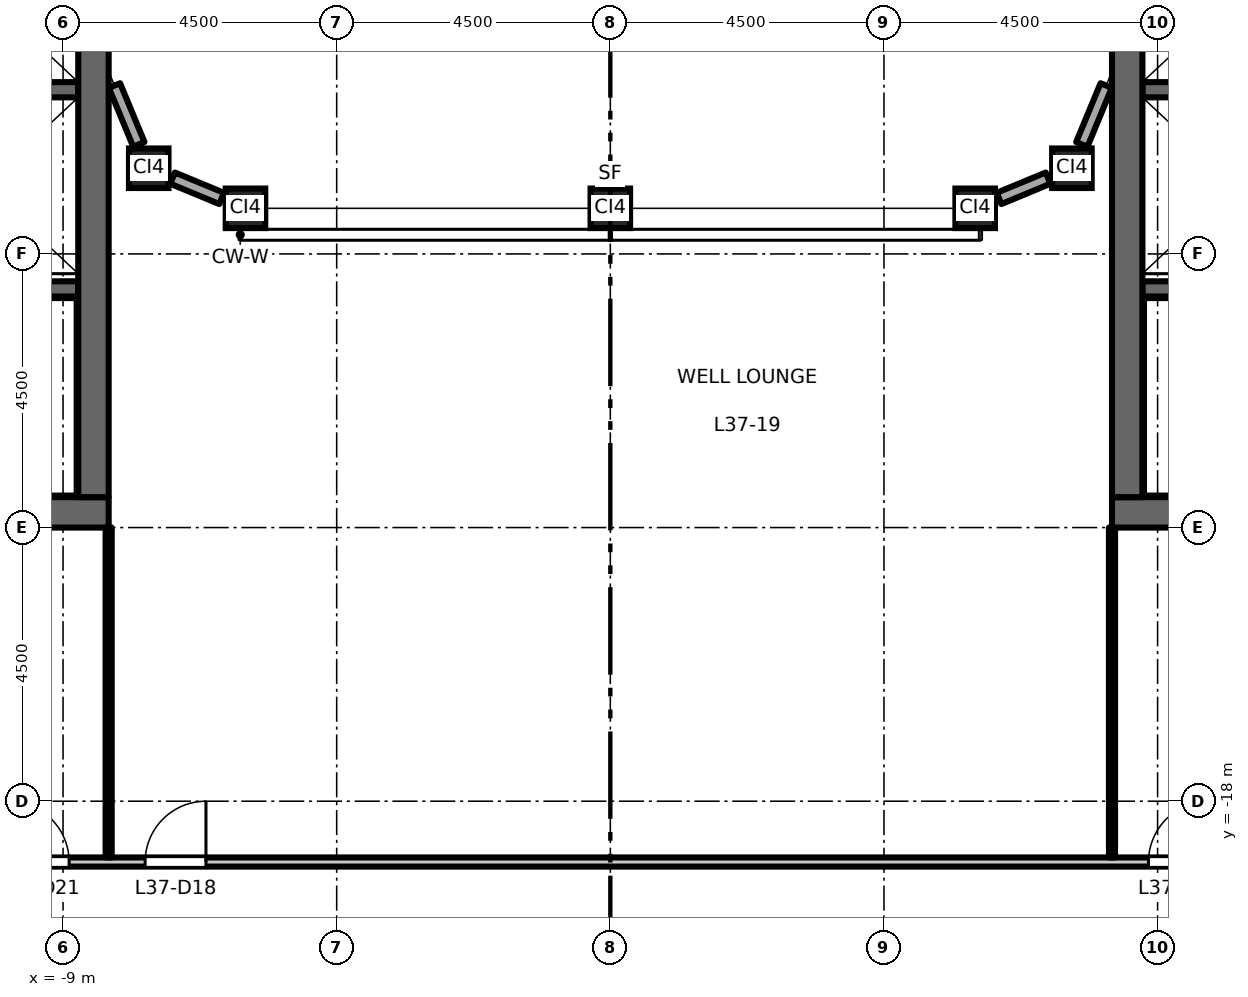
"""IFC4 building model, lengths in metres.
Left out: names, types, materials, properties, quantities, classifications, styles, units other than length and angle.
Written with IfcOpenShell. Run it as: python <this file> out.ifc"""

import sys

from ifc_helpers import new_model, si_unit, direction, frame, frame_2d, origin, origin_2d, place, context, subcontext, project, spatial, rectangle, hollow_rectangle, extrude, element, fill, save


model = new_model("IFC4")
c1 = context("Model", 3, precision=1e-05, world=origin(), true_north=direction((0.0, 1.0)))
c2 = subcontext(c1, "Body", "Model", "MODEL_VIEW")
j1 = project(units=[si_unit("LENGTHUNIT", "METRE"), si_unit("PLANEANGLEUNIT", "RADIAN")], contexts=[c1])
p1 = place(None, origin())
s1 = spatial("IfcSite", under=j1, at=p1, CompositionType="ELEMENT")
p2 = place(p1, origin())
s2 = spatial("IfcBuilding", under=s1, at=p2, CompositionType="ELEMENT")
p3 = place(p2, frame((0.0, 0.0, 172.2)))
s3 = spatial("IfcBuildingStorey", under=s2, at=p3, CompositionType="ELEMENT", Elevation=172.2)
for number, where, z_axis, x_axis in (
    (1, (-7.591, -7.591, 0.0), (0.0, 0.0, 1.0), (1.0, 0.0, 0.0)),
    (2, (-6.0, -8.25, 0.0), (0.0, 0.0, 1.0), (1.0, 0.0, 0.0)),
    (3, (0.0, -8.25, 0.0), (0.0, 0.0, 1.0), (1.0, 0.0, 0.0)),
    (4, (6.0, -8.25, 0.0), (0.0, 0.0, 1.0), (1.0, 0.0, 0.0)),
    (5, (7.591, -7.591, 0.0), (0.0, 0.0, 1.0), (1.0, 0.0, 0.0)),
):
    element("IfcColumn", number, at=place(p3, frame(where, z_axis=z_axis, x_axis=x_axis)), inside=s3, PredefinedType="COLUMN", context=c2, shape_type="SweptSolid", body=[
        extrude(hollow_rectangle(XDim=0.65, YDim=0.65, WallThickness=0.036, at=origin_2d()), origin(), (0.0, 0.0, 1.0), 4.5),
    ])
p4 = place(p3, frame((-8.75, -6.3, 0.0), z_axis=(0.0, 0.0, 1.0), x_axis=(-1.0, 0.0, 0.0)))
e6 = element("IfcWall", 6, at=p4, inside=s3, PredefinedType="SHEAR", context=c2, shape_type="SweptSolid", body=[
    extrude(rectangle(XDim=3.1, YDim=0.25, at=frame_2d((1.55, 0.0))), origin(), (0.0, 0.0, 1.0), 4.35),
])
p5 = place(p3, frame((-8.75, -9.575, 0.0), z_axis=(0.0, 0.0, 1.0), x_axis=(-1.0, 0.0, 0.0)))
e7 = element("IfcWall", 7, at=p5, inside=s3, PredefinedType="SHEAR", context=c2, shape_type="SweptSolid", body=[
    extrude(rectangle(XDim=8.0, YDim=0.25, at=frame_2d((4.0, 0.0))), origin(), (0.0, 0.0, 1.0), 4.35),
])
p6 = place(p5, frame((6.65, 0.0, 0.0)))
e8 = element("IfcOpeningElement", 8, at=p6, cuts=e7, PredefinedType="OPENING", context=c2, shape_type="SweptSolid", body=[
    extrude(rectangle(XDim=1.1, YDim=2.1, at=frame_2d((0.55, 1.05))), frame((0.0, 0.135, 0.0), z_axis=(0.0, -1.0, 0.0), x_axis=(1.0, 0.0, 0.0)), (0.0, 0.0, 1.0), 0.27),
])
p7 = place(p3, frame((-8.25, -13.25, 0.0), z_axis=(0.0, 0.0, 1.0), x_axis=(-1.0, 0.0, 0.0)))
e9 = element("IfcWall", 9, at=p7, inside=s3, PredefinedType="SHEAR", context=c2, shape_type="SweptSolid", body=[
    extrude(rectangle(XDim=13.5, YDim=0.5, at=frame_2d((6.75, 0.0))), origin(), (0.0, 0.0, 1.0), 4.35),
])
p8 = place(p3, frame((-8.5, -13.0, 0.0), z_axis=(0.0, 0.0, 1.0), x_axis=(0.0, 1.0, 0.0)))
e10 = element("IfcWall", 10, at=p8, inside=s3, PredefinedType="SHEAR", context=c2, shape_type="SweptSolid", body=[
    extrude(rectangle(XDim=26.0, YDim=0.5, at=frame_2d((13.0, 0.0))), origin(), (0.0, 0.0, 1.0), 4.35),
])
p9 = place(p3, frame((8.75, -6.3, 0.0), z_axis=(0.0, 0.0, 1.0), x_axis=(1.0, 0.0, 0.0)))
e11 = element("IfcWall", 11, at=p9, inside=s3, PredefinedType="SHEAR", context=c2, shape_type="SweptSolid", body=[
    extrude(rectangle(XDim=3.1, YDim=0.25, at=frame_2d((1.55, 0.0))), origin(), (0.0, 0.0, 1.0), 4.35),
])
p10 = place(p3, frame((8.75, -9.575, 0.0), z_axis=(0.0, 0.0, 1.0), x_axis=(1.0, 0.0, 0.0)))
e12 = element("IfcWall", 12, at=p10, inside=s3, PredefinedType="SHEAR", context=c2, shape_type="SweptSolid", body=[
    extrude(rectangle(XDim=8.0, YDim=0.25, at=frame_2d((4.0, 0.0))), origin(), (0.0, 0.0, 1.0), 4.35),
])
p11 = place(p10, frame((6.65, 0.0, 0.0)))
e13 = element("IfcOpeningElement", 13, at=p11, cuts=e12, PredefinedType="OPENING", context=c2, shape_type="SweptSolid", body=[
    extrude(rectangle(XDim=1.1, YDim=2.1, at=frame_2d((0.55, 1.05))), frame((0.0, 0.135, 0.0), z_axis=(0.0, -1.0, 0.0), x_axis=(1.0, 0.0, 0.0)), (0.0, 0.0, 1.0), 0.27),
])
p12 = place(p3, frame((8.25, -13.25, 0.0), z_axis=(0.0, 0.0, 1.0), x_axis=(1.0, 0.0, 0.0)))
e14 = element("IfcWall", 14, at=p12, inside=s3, PredefinedType="SHEAR", context=c2, shape_type="SweptSolid", body=[
    extrude(rectangle(XDim=13.5, YDim=0.5, at=frame_2d((6.75, 0.0))), origin(), (0.0, 0.0, 1.0), 4.35),
])
p13 = place(p3, frame((8.5, -13.0, 0.0), z_axis=(0.0, 0.0, 1.0), x_axis=(0.0, 1.0, 0.0)))
e15 = element("IfcWall", 15, at=p13, inside=s3, PredefinedType="SHEAR", context=c2, shape_type="SweptSolid", body=[
    extrude(rectangle(XDim=26.0, YDim=0.5, at=frame_2d((13.0, 0.0))), origin(), (0.0, 0.0, 1.0), 4.35),
])
p14 = place(p3, frame((6.392, -8.087, 0.0), z_axis=(0.0, 0.0, 1.0), x_axis=(0.923894108428, 0.382648241093, 0.0)))
e16 = element("IfcWall", 16, at=p14, inside=s3, PredefinedType="STANDARD", context=c2, shape_type="SweptSolid", body=[
    extrude(rectangle(XDim=0.873, YDim=0.2, at=frame_2d((0.437, 0.0))), origin(), (0.0, 0.0, 1.0), 3.826),
])
for number, where, z_axis, x_axis in (
    (17, (7.753, -7.199, 0.0), (0.0, 0.0, 1.0), (0.383, 0.924, 0.0)),
    (18, (-8.154, -6.231, 0.0), (0.0, 0.0, 1.0), (0.383, -0.924, 0.0)),
):
    element("IfcWall", number, at=place(p3, frame(where, z_axis=z_axis, x_axis=x_axis)), inside=s3, PredefinedType="STANDARD", context=c2, shape_type="SweptSolid", body=[
        extrude(rectangle(XDim=1.048, YDim=0.2, at=frame_2d((0.524, 0.0))), origin(), (0.0, 0.0, 1.0), 3.826),
    ])
p15 = place(p3, frame((-7.199, -7.753, 0.0), z_axis=(0.0, 0.0, 1.0), x_axis=(0.923894108428, -0.382648241093, 0.0)))
e19 = element("IfcWall", 19, at=p15, inside=s3, PredefinedType="STANDARD", context=c2, shape_type="SweptSolid", body=[
    extrude(rectangle(XDim=0.873, YDim=0.2, at=frame_2d((0.437, 0.0))), origin(), (0.0, 0.0, 1.0), 3.826),
])
p16 = place(p3, frame((-21.825, -19.0, 0.0), z_axis=(0.0, 0.0, 1.0), x_axis=(1.0, 0.0, 0.0)))
e20 = element("IfcWall", 20, at=p16, inside=s3, PredefinedType="PARTITIONING", context=c2, shape_type="SweptSolid", body=[
    extrude(rectangle(XDim=43.65, YDim=0.15, at=frame_2d((21.825, 0.0))), origin(), (0.0, 0.0, 1.0), 4.35),
])
p17 = place(p16, frame((14.175, 0.0, 0.0)))
e21 = element("IfcOpeningElement", 21, at=p17, cuts=e20, PredefinedType="OPENING", context=c2, shape_type="SweptSolid", body=[
    extrude(rectangle(XDim=1.0, YDim=2.1, at=frame_2d((0.5, 1.05))), frame((0.0, 0.085, 0.0), z_axis=(0.0, -1.0, 0.0), x_axis=(1.0, 0.0, 0.0)), (0.0, 0.0, 1.0), 0.17),
])
p18 = place(p16, frame((11.925, 0.0, 0.0)))
e22 = element("IfcOpeningElement", 22, at=p18, cuts=e20, PredefinedType="OPENING", context=c2, shape_type="SweptSolid", body=[
    extrude(rectangle(XDim=1.0, YDim=2.1, at=frame_2d((0.5, 1.05))), frame((0.0, 0.085, 0.0), z_axis=(0.0, -1.0, 0.0), x_axis=(1.0, 0.0, 0.0)), (0.0, 0.0, 1.0), 0.17),
])
p19 = place(p16, frame((30.675, 0.0, 0.0)))
e23 = element("IfcOpeningElement", 23, at=p19, cuts=e20, PredefinedType="OPENING", context=c2, shape_type="SweptSolid", body=[
    extrude(rectangle(XDim=1.0, YDim=2.1, at=frame_2d((0.5, 1.05))), frame((0.0, 0.085, 0.0), z_axis=(0.0, -1.0, 0.0), x_axis=(1.0, 0.0, 0.0)), (0.0, 0.0, 1.0), 0.17),
])
for number, where, z_axis, x_axis in (
    (24, (-8.25, -18.925, 0.0), (0.0, 0.0, 1.0), (0.0, 1.0, 0.0)),
    (25, (8.25, -18.925, 0.0), (0.0, 0.0, 1.0), (0.0, 1.0, 0.0)),
):
    element("IfcWall", number, at=place(p3, frame(where, z_axis=z_axis, x_axis=x_axis)), inside=s3, PredefinedType="PARTITIONING", context=c2, shape_type="SweptSolid", body=[
        extrude(rectangle(XDim=5.425, YDim=0.1, at=frame_2d((2.712, 0.0))), origin(), (0.0, 0.0, 1.0), 4.35),
    ])
p20 = place(p17, origin())
e26 = element("IfcDoor", 26, at=p20, inside=s3, OperationType="SINGLE_SWING_RIGHT", PredefinedType="DOOR", context=c2, shape_type="SweptSolid", body=[
    extrude(rectangle(XDim=1.0, YDim=2.1, at=frame_2d((0.5, 1.05))), frame((0.0, 0.025, 0.0), z_axis=(0.0, -1.0, 0.0), x_axis=(1.0, 0.0, 0.0)), (0.0, 0.0, 1.0), 0.05),
])
fill(e21, e26)
p21 = place(p18, origin())
e27 = element("IfcDoor", 27, at=p21, inside=s3, OperationType="SINGLE_SWING_LEFT", PredefinedType="DOOR", context=c2, shape_type="SweptSolid", body=[
    extrude(rectangle(XDim=1.0, YDim=2.1, at=frame_2d((0.5, 1.05))), frame((0.0, 0.025, 0.0), z_axis=(0.0, -1.0, 0.0), x_axis=(1.0, 0.0, 0.0)), (0.0, 0.0, 1.0), 0.05),
])
fill(e22, e27)
p22 = place(p19, origin())
e28 = element("IfcDoor", 28, at=p22, inside=s3, OperationType="SINGLE_SWING_RIGHT", PredefinedType="DOOR", context=c2, shape_type="SweptSolid", body=[
    extrude(rectangle(XDim=1.0, YDim=2.1, at=frame_2d((0.5, 1.05))), frame((0.0, 0.025, 0.0), z_axis=(0.0, -1.0, 0.0), x_axis=(1.0, 0.0, 0.0)), (0.0, 0.0, 1.0), 0.05),
])
fill(e23, e28)
save(model, sys.argv[1])
